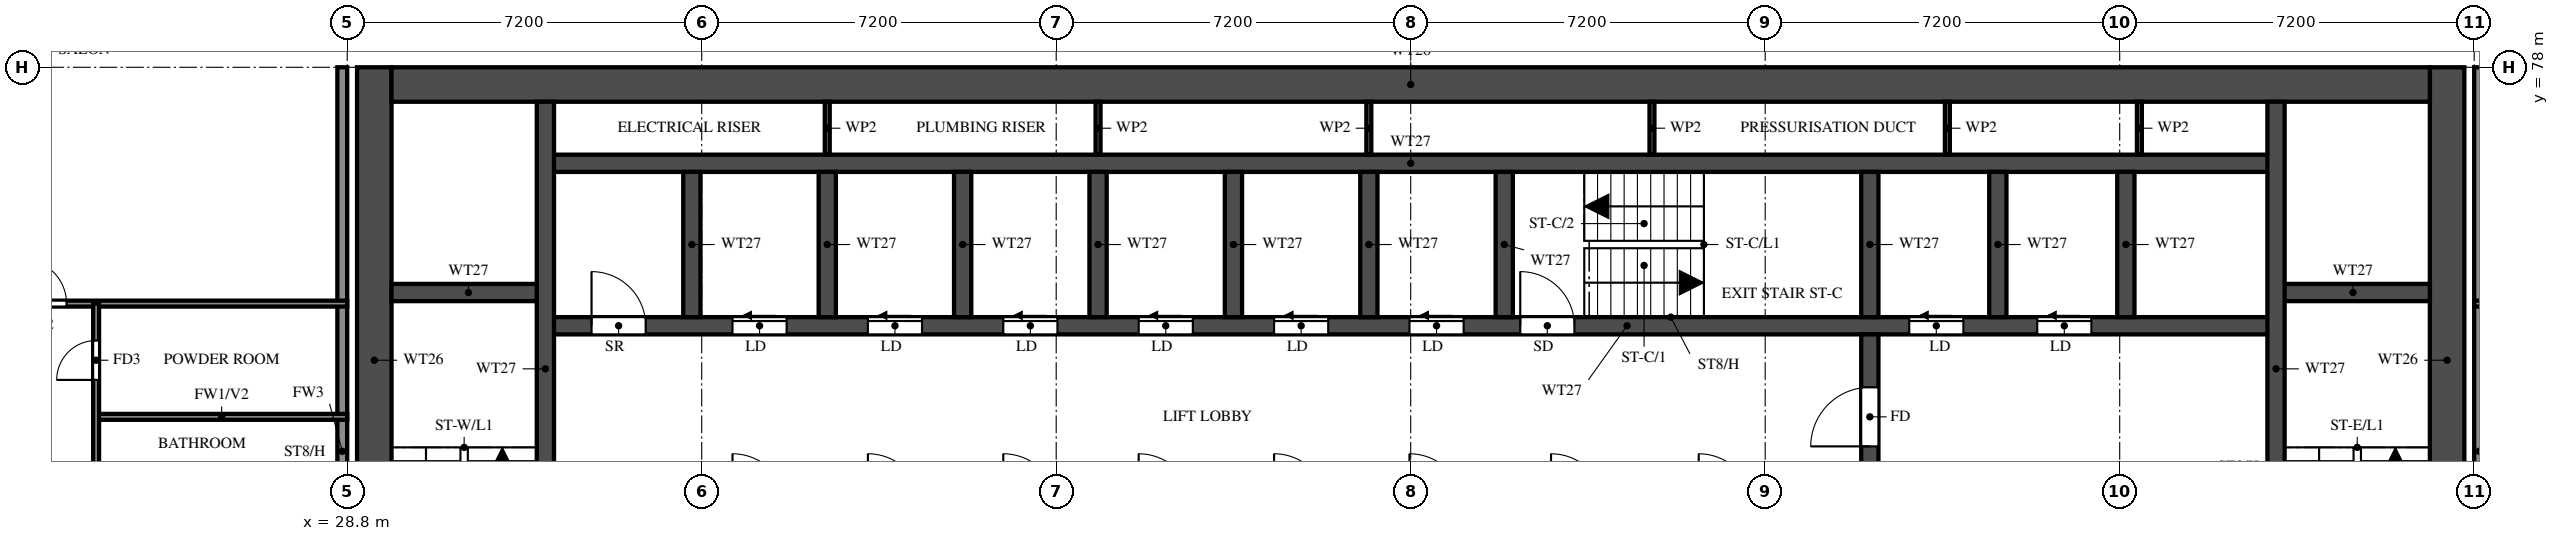
"""IFC4 building model, lengths in metres.
Left out: names, types, materials, properties, quantities, classifications, styles, units other than length and angle.
Written with IfcOpenShell. Run it as: python <this file> out.ifc"""

import sys

from ifc_helpers import new_model, si_unit, direction, frame, frame_2d, origin, place, context, subcontext, project, spatial, rectangle, extrude, element, fill, save


model = new_model("IFC4")
c1 = context("Model", 3, precision=1e-05, world=origin(), true_north=direction((0.0, 1.0)))
c2 = subcontext(c1, "Body", "Model", "MODEL_VIEW")
j1 = project(units=[si_unit("LENGTHUNIT", "METRE"), si_unit("PLANEANGLEUNIT", "RADIAN")], contexts=[c1])
p1 = place(None, origin())
s1 = spatial("IfcSite", under=j1, at=p1, CompositionType="ELEMENT")
p2 = place(p1, origin())
s2 = spatial("IfcBuilding", under=s1, at=p2, CompositionType="ELEMENT")
p3 = place(p2, frame((0.0, 0.0, 174.5)))
s3 = spatial("IfcBuildingStorey", under=s2, at=p3, CompositionType="ELEMENT", Elevation=174.5)
for number, where, z_axis, x_axis in (
    (1, (29.35, 66.1, 0.0), (0.0, 0.0, 1.0), (0.0, 1.0, 0.0)),
    (2, (71.45, 66.1, 0.0), (0.0, 0.0, 1.0), (0.0, 1.0, 0.0)),
):
    element("IfcWall", number, at=place(p3, frame(where, z_axis=z_axis, x_axis=x_axis)), inside=s3, PredefinedType="SHEAR", context=c2, shape_type="SweptSolid", body=[
        extrude(rectangle(XDim=11.9, YDim=0.7, at=frame_2d((5.95, 0.0))), origin(), (0.0, 0.0, 1.0), 3.2),
    ])
p4 = place(p3, frame((29.7, 77.65, 0.0), z_axis=(0.0, 0.0, 1.0), x_axis=(1.0, 0.0, 0.0)))
e3 = element("IfcWall", 3, at=p4, inside=s3, PredefinedType="SHEAR", context=c2, shape_type="SweptSolid", body=[
    extrude(rectangle(XDim=41.4, YDim=0.7, at=frame_2d((20.7, 0.0))), origin(), (0.0, 0.0, 1.0), 3.2),
])
p5 = place(p3, frame((32.825, 72.75, 0.0), z_axis=(0.0, 0.0, 1.0), x_axis=(1.0, 0.0, 0.0)))
e4 = element("IfcWall", 4, at=p5, inside=s3, PredefinedType="SHEAR", context=c2, shape_type="SweptSolid", body=[
    extrude(rectangle(XDim=35.15, YDim=0.35, at=frame_2d((17.575, 0.0))), origin(), (0.0, 0.0, 1.0), 3.2),
])
p6 = place(p5, frame((19.8, 0.0, 0.0)))
e5 = element("IfcOpeningElement", 5, at=p6, cuts=e4, PredefinedType="OPENING", context=c2, shape_type="SweptSolid", body=[
    extrude(rectangle(XDim=1.1, YDim=2.1, at=frame_2d((0.55, 1.05))), frame((0.0, 0.185, 0.0), z_axis=(0.0, -1.0, 0.0), x_axis=(1.0, 0.0, 0.0)), (0.0, 0.0, 1.0), 0.37),
])
p7 = place(p5, frame((27.7, 0.0, 0.0)))
e6 = element("IfcOpeningElement", 6, at=p7, cuts=e4, PredefinedType="OPENING", context=c2, shape_type="SweptSolid", body=[
    extrude(rectangle(XDim=1.1, YDim=2.1, at=frame_2d((0.55, 1.05))), frame((0.0, 0.185, 0.0), z_axis=(0.0, -1.0, 0.0), x_axis=(1.0, 0.0, 0.0)), (0.0, 0.0, 1.0), 0.37),
])
p8 = place(p5, frame((30.3, 0.0, 0.0)))
e7 = element("IfcOpeningElement", 7, at=p8, cuts=e4, PredefinedType="OPENING", context=c2, shape_type="SweptSolid", body=[
    extrude(rectangle(XDim=1.1, YDim=2.1, at=frame_2d((0.55, 1.05))), frame((0.0, 0.185, 0.0), z_axis=(0.0, -1.0, 0.0), x_axis=(1.0, 0.0, 0.0)), (0.0, 0.0, 1.0), 0.37),
])
p9 = place(p5, frame((3.8, 0.0, 0.0)))
e8 = element("IfcOpeningElement", 8, at=p9, cuts=e4, PredefinedType="OPENING", context=c2, shape_type="SweptSolid", body=[
    extrude(rectangle(XDim=1.1, YDim=2.1, at=frame_2d((0.55, 1.05))), frame((0.0, 0.185, 0.0), z_axis=(0.0, -1.0, 0.0), x_axis=(1.0, 0.0, 0.0)), (0.0, 0.0, 1.0), 0.37),
])
p10 = place(p5, frame((6.55, 0.0, 0.0)))
e9 = element("IfcOpeningElement", 9, at=p10, cuts=e4, PredefinedType="OPENING", context=c2, shape_type="SweptSolid", body=[
    extrude(rectangle(XDim=1.1, YDim=2.1, at=frame_2d((0.55, 1.05))), frame((0.0, 0.185, 0.0), z_axis=(0.0, -1.0, 0.0), x_axis=(1.0, 0.0, 0.0)), (0.0, 0.0, 1.0), 0.37),
])
p11 = place(p5, frame((9.3, 0.0, 0.0)))
e10 = element("IfcOpeningElement", 10, at=p11, cuts=e4, PredefinedType="OPENING", context=c2, shape_type="SweptSolid", body=[
    extrude(rectangle(XDim=1.1, YDim=2.1, at=frame_2d((0.55, 1.05))), frame((0.0, 0.185, 0.0), z_axis=(0.0, -1.0, 0.0), x_axis=(1.0, 0.0, 0.0)), (0.0, 0.0, 1.0), 0.37),
])
p12 = place(p5, frame((12.05, 0.0, 0.0)))
e11 = element("IfcOpeningElement", 11, at=p12, cuts=e4, PredefinedType="OPENING", context=c2, shape_type="SweptSolid", body=[
    extrude(rectangle(XDim=1.1, YDim=2.1, at=frame_2d((0.55, 1.05))), frame((0.0, 0.185, 0.0), z_axis=(0.0, -1.0, 0.0), x_axis=(1.0, 0.0, 0.0)), (0.0, 0.0, 1.0), 0.37),
])
p13 = place(p5, frame((14.8, 0.0, 0.0)))
e12 = element("IfcOpeningElement", 12, at=p13, cuts=e4, PredefinedType="OPENING", context=c2, shape_type="SweptSolid", body=[
    extrude(rectangle(XDim=1.1, YDim=2.1, at=frame_2d((0.55, 1.05))), frame((0.0, 0.185, 0.0), z_axis=(0.0, -1.0, 0.0), x_axis=(1.0, 0.0, 0.0)), (0.0, 0.0, 1.0), 0.37),
])
p14 = place(p5, frame((17.55, 0.0, 0.0)))
e13 = element("IfcOpeningElement", 13, at=p14, cuts=e4, PredefinedType="OPENING", context=c2, shape_type="SweptSolid", body=[
    extrude(rectangle(XDim=1.1, YDim=2.1, at=frame_2d((0.55, 1.05))), frame((0.0, 0.185, 0.0), z_axis=(0.0, -1.0, 0.0), x_axis=(1.0, 0.0, 0.0)), (0.0, 0.0, 1.0), 0.37),
])
p15 = place(p5, frame((0.938, 0.0, 0.0)))
e14 = element("IfcOpeningElement", 14, at=p15, cuts=e4, PredefinedType="OPENING", context=c2, shape_type="SweptSolid", body=[
    extrude(rectangle(XDim=1.1, YDim=2.1, at=frame_2d((0.55, 1.05))), frame((0.0, 0.185, 0.0), z_axis=(0.0, -1.0, 0.0), x_axis=(1.0, 0.0, 0.0)), (0.0, 0.0, 1.0), 0.37),
])
p16 = place(p3, frame((32.825, 76.05, 0.0), z_axis=(0.0, 0.0, 1.0), x_axis=(1.0, 0.0, 0.0)))
e15 = element("IfcWall", 15, at=p16, inside=s3, PredefinedType="SHEAR", context=c2, shape_type="SweptSolid", body=[
    extrude(rectangle(XDim=35.15, YDim=0.35, at=frame_2d((17.575, 0.0))), origin(), (0.0, 0.0, 1.0), 3.2),
])
for number, where, z_axis, x_axis in (
    (16, (29.7, 73.425, 0.0), (0.0, 0.0, 1.0), (1.0, 0.0, 0.0)),
    (17, (67.975, 73.425, 0.0), (0.0, 0.0, 1.0), (1.0, 0.0, 0.0)),
):
    element("IfcWall", number, at=place(p3, frame(where, z_axis=z_axis, x_axis=x_axis)), inside=s3, PredefinedType="SHEAR", context=c2, shape_type="SweptSolid", body=[
        extrude(rectangle(XDim=3.125, YDim=0.35, at=frame_2d((1.562, 0.0))), origin(), (0.0, 0.0, 1.0), 3.2),
    ])
p17 = place(p3, frame((32.825, 66.45, 0.0), z_axis=(0.0, 0.0, 1.0), x_axis=(0.0, 1.0, 0.0)))
e18 = element("IfcWall", 18, at=p17, inside=s3, PredefinedType="SHEAR", context=c2, shape_type="SweptSolid", body=[
    extrude(rectangle(XDim=10.85, YDim=0.35, at=frame_2d((5.425, 0.0))), origin(), (0.0, 0.0, 1.0), 3.2),
])
p18 = place(p3, frame((67.975, 66.45, 0.0), z_axis=(0.0, 0.0, 1.0), x_axis=(0.0, 1.0, 0.0)))
e19 = element("IfcWall", 19, at=p18, inside=s3, PredefinedType="SHEAR", context=c2, shape_type="SweptSolid", body=[
    extrude(rectangle(XDim=10.85, YDim=0.35, at=frame_2d((5.425, 0.0))), origin(), (0.0, 0.0, 1.0), 3.2),
])
p19 = place(p18, frame((0.15, 0.0, 0.0)))
e20 = element("IfcOpeningElement", 20, at=p19, cuts=e19, PredefinedType="OPENING", context=c2, shape_type="SweptSolid", body=[
    extrude(rectangle(XDim=1.1, YDim=2.1, at=frame_2d((0.55, 1.05))), frame((0.0, 0.185, 0.0), z_axis=(0.0, -1.0, 0.0), x_axis=(1.0, 0.0, 0.0)), (0.0, 0.0, 1.0), 0.37),
])
p20 = place(p3, frame((59.725, 66.45, 0.0), z_axis=(0.0, 0.0, 1.0), x_axis=(0.0, 1.0, 0.0)))
e21 = element("IfcWall", 21, at=p20, inside=s3, PredefinedType="SHEAR", context=c2, shape_type="SweptSolid", body=[
    extrude(rectangle(XDim=6.125, YDim=0.35, at=frame_2d((3.062, 0.0))), origin(), (0.0, 0.0, 1.0), 3.2),
])
p21 = place(p20, frame((3.85, 0.0, 0.0)))
e22 = element("IfcOpeningElement", 22, at=p21, cuts=e21, PredefinedType="OPENING", context=c2, shape_type="SweptSolid", body=[
    extrude(rectangle(XDim=1.2, YDim=2.1, at=frame_2d((0.6, 1.05))), frame((0.0, 0.185, 0.0), z_axis=(0.0, -1.0, 0.0), x_axis=(1.0, 0.0, 0.0)), (0.0, 0.0, 1.0), 0.37),
])
for number, where, z_axis, x_axis in (
    (23, (59.725, 72.925, 0.0), (0.0, 0.0, 1.0), (0.0, 1.0, 0.0)),
    (24, (35.8, 72.925, 0.0), (0.0, 0.0, 1.0), (0.0, 1.0, 0.0)),
    (25, (38.55, 72.925, 0.0), (0.0, 0.0, 1.0), (0.0, 1.0, 0.0)),
    (26, (41.3, 72.925, 0.0), (0.0, 0.0, 1.0), (0.0, 1.0, 0.0)),
    (27, (44.05, 72.925, 0.0), (0.0, 0.0, 1.0), (0.0, 1.0, 0.0)),
    (28, (46.8, 72.925, 0.0), (0.0, 0.0, 1.0), (0.0, 1.0, 0.0)),
    (29, (49.55, 72.925, 0.0), (0.0, 0.0, 1.0), (0.0, 1.0, 0.0)),
    (30, (52.3, 72.925, 0.0), (0.0, 0.0, 1.0), (0.0, 1.0, 0.0)),
    (31, (62.325, 72.925, 0.0), (0.0, 0.0, 1.0), (0.0, 1.0, 0.0)),
    (32, (64.925, 72.925, 0.0), (0.0, 0.0, 1.0), (0.0, 1.0, 0.0)),
):
    element("IfcWall", number, at=place(p3, frame(where, z_axis=z_axis, x_axis=x_axis)), inside=s3, PredefinedType="SHEAR", context=c2, shape_type="SweptSolid", body=[
        extrude(rectangle(XDim=2.95, YDim=0.35, at=frame_2d((1.475, 0.0))), origin(), (0.0, 0.0, 1.0), 3.2),
    ])
for number, where, z_axis, x_axis in (
    (33, (38.55, 76.225, 0.0), (0.0, 0.0, 1.0), (0.0, 1.0, 0.0)),
    (34, (44.05, 76.225, 0.0), (0.0, 0.0, 1.0), (0.0, 1.0, 0.0)),
    (35, (49.55, 76.225, 0.0), (0.0, 0.0, 1.0), (0.0, 1.0, 0.0)),
    (36, (55.3, 76.225, 0.0), (0.0, 0.0, 1.0), (0.0, 1.0, 0.0)),
    (37, (61.3, 76.225, 0.0), (0.0, 0.0, 1.0), (0.0, 1.0, 0.0)),
    (38, (65.2, 76.225, 0.0), (0.0, 0.0, 1.0), (0.0, 1.0, 0.0)),
):
    element("IfcWall", number, at=place(p3, frame(where, z_axis=z_axis, x_axis=x_axis)), inside=s3, PredefinedType="PARTITIONING", context=c2, shape_type="SweptSolid", body=[
        extrude(rectangle(XDim=1.075, YDim=0.1, at=frame_2d((0.538, 0.0))), origin(), (0.0, 0.0, 1.0), 3.2),
    ])
for number, where, z_axis, x_axis in (
    (39, (28.7, 62.4, 0.0), (0.0, 0.0, 1.0), (0.0, 1.0, 0.0)),
    (40, (72.1, 62.4, 0.0), (0.0, 0.0, 1.0), (0.0, 1.0, 0.0)),
):
    element("IfcWall", number, at=place(p3, frame(where, z_axis=z_axis, x_axis=x_axis)), inside=s3, PredefinedType="SOLIDWALL", context=c2, shape_type="SweptSolid", body=[
        extrude(rectangle(XDim=15.6, YDim=0.2, at=frame_2d((7.8, 0.0))), origin(), (0.0, 0.0, 1.0), 3.2),
    ])
p22 = place(p3, frame((23.7, 70.9, 0.0), z_axis=(0.0, 0.0, 1.0), x_axis=(1.0, 0.0, 0.0)))
e41 = element("IfcWall", 41, at=p22, inside=s3, PredefinedType="PARTITIONING", context=c2, shape_type="SweptSolid", body=[
    extrude(rectangle(XDim=5.1, YDim=0.12, at=frame_2d((2.55, 0.0))), origin(), (0.0, 0.0, 1.0), 3.2),
])
p23 = place(p3, frame((14.525, 73.2, 0.0), z_axis=(0.0, 0.0, 1.0), x_axis=(1.0, 0.0, 0.0)))
e42 = element("IfcWall", 42, at=p23, inside=s3, PredefinedType="PARTITIONING", context=c2, shape_type="SweptSolid", body=[
    extrude(rectangle(XDim=14.275, YDim=0.12, at=frame_2d((7.138, 0.0))), origin(), (0.0, 0.0, 1.0), 2.3),
])
p24 = place(p23, frame((7.675, 0.0, 0.0)))
e43 = element("IfcOpeningElement", 43, at=p24, cuts=e42, PredefinedType="OPENING", context=c2, shape_type="SweptSolid", body=[
    extrude(rectangle(XDim=0.9, YDim=2.1, at=frame_2d((0.45, 1.05))), frame((0.0, 0.07, 0.0), z_axis=(0.0, -1.0, 0.0), x_axis=(1.0, 0.0, 0.0)), (0.0, 0.0, 1.0), 0.14),
])
p25 = place(p3, frame((72.0, 73.2, 0.0), z_axis=(0.0, 0.0, 1.0), x_axis=(1.0, 0.0, 0.0)))
e44 = element("IfcWall", 44, at=p25, inside=s3, PredefinedType="PARTITIONING", context=c2, shape_type="SweptSolid", body=[
    extrude(rectangle(XDim=14.275, YDim=0.12, at=frame_2d((7.137, 0.0))), origin(), (0.0, 0.0, 1.0), 2.3),
])
p26 = place(p25, frame((5.7, 0.0, 0.0)))
e45 = element("IfcOpeningElement", 45, at=p26, cuts=e44, PredefinedType="OPENING", context=c2, shape_type="SweptSolid", body=[
    extrude(rectangle(XDim=0.9, YDim=2.1, at=frame_2d((0.45, 1.05))), frame((0.0, 0.07, 0.0), z_axis=(0.0, -1.0, 0.0), x_axis=(1.0, 0.0, 0.0)), (0.0, 0.0, 1.0), 0.14),
])
p27 = place(p3, frame((23.7, 61.2, 0.0), z_axis=(0.0, 0.0, 1.0), x_axis=(0.0, 1.0, 0.0)))
e46 = element("IfcWall", 46, at=p27, inside=s3, PredefinedType="PARTITIONING", context=c2, shape_type="SweptSolid", body=[
    extrude(rectangle(XDim=12.0, YDim=0.12, at=frame_2d((6.0, 0.0))), origin(), (0.0, 0.0, 1.0), 3.2),
])
p28 = place(p27, frame((4.2, 0.0, 0.0)))
e47 = element("IfcOpeningElement", 47, at=p28, cuts=e46, PredefinedType="OPENING", context=c2, shape_type="SweptSolid", body=[
    extrude(rectangle(XDim=0.9, YDim=2.1, at=frame_2d((0.45, 1.05))), frame((0.0, 0.07, 0.0), z_axis=(0.0, -1.0, 0.0), x_axis=(1.0, 0.0, 0.0)), (0.0, 0.0, 1.0), 0.14),
])
p29 = place(p27, frame((7.975, 0.0, 0.0)))
e48 = element("IfcOpeningElement", 48, at=p29, cuts=e46, PredefinedType="OPENING", context=c2, shape_type="SweptSolid", body=[
    extrude(rectangle(XDim=0.8, YDim=2.1, at=frame_2d((0.4, 1.05))), frame((0.0, 0.07, 0.0), z_axis=(0.0, -1.0, 0.0), x_axis=(1.0, 0.0, 0.0)), (0.0, 0.0, 1.0), 0.14),
])
p30 = place(p27, frame((10.45, 0.0, 0.0)))
e49 = element("IfcOpeningElement", 49, at=p30, cuts=e46, PredefinedType="OPENING", context=c2, shape_type="SweptSolid", body=[
    extrude(rectangle(XDim=0.8, YDim=2.1, at=frame_2d((0.4, 1.05))), frame((0.0, 0.07, 0.0), z_axis=(0.0, -1.0, 0.0), x_axis=(1.0, 0.0, 0.0)), (0.0, 0.0, 1.0), 0.14),
])
p31 = place(p6, origin())
e50 = element("IfcDoor", 50, at=p31, inside=s3, OperationType="SINGLE_SWING_LEFT", PredefinedType="DOOR", context=c2, shape_type="SweptSolid", body=[
    extrude(rectangle(XDim=1.1, YDim=2.1, at=frame_2d((0.55, 1.05))), frame((0.0, 0.025, 0.0), z_axis=(0.0, -1.0, 0.0), x_axis=(1.0, 0.0, 0.0)), (0.0, 0.0, 1.0), 0.05),
])
fill(e5, e50)
p32 = place(p21, origin())
e51 = element("IfcDoor", 51, at=p32, inside=s3, OperationType="SINGLE_SWING_LEFT", PredefinedType="DOOR", context=c2, shape_type="SweptSolid", body=[
    extrude(rectangle(XDim=1.2, YDim=2.1, at=frame_2d((0.6, 1.05))), frame((0.0, 0.025, 0.0), z_axis=(0.0, -1.0, 0.0), x_axis=(1.0, 0.0, 0.0)), (0.0, 0.0, 1.0), 0.05),
])
fill(e22, e51)
p33 = place(p7, origin())
e52 = element("IfcDoor", 52, at=p33, inside=s3, OperationType="SLIDING_TO_LEFT", PredefinedType="DOOR", context=c2, shape_type="SweptSolid", body=[
    extrude(rectangle(XDim=1.1, YDim=2.1, at=frame_2d((0.55, 1.05))), frame((0.0, 0.025, 0.0), z_axis=(0.0, -1.0, 0.0), x_axis=(1.0, 0.0, 0.0)), (0.0, 0.0, 1.0), 0.05),
])
fill(e6, e52)
p34 = place(p8, origin())
e53 = element("IfcDoor", 53, at=p34, inside=s3, OperationType="SLIDING_TO_LEFT", PredefinedType="DOOR", context=c2, shape_type="SweptSolid", body=[
    extrude(rectangle(XDim=1.1, YDim=2.1, at=frame_2d((0.55, 1.05))), frame((0.0, 0.025, 0.0), z_axis=(0.0, -1.0, 0.0), x_axis=(1.0, 0.0, 0.0)), (0.0, 0.0, 1.0), 0.05),
])
fill(e7, e53)
p35 = place(p9, origin())
e54 = element("IfcDoor", 54, at=p35, inside=s3, OperationType="SLIDING_TO_LEFT", PredefinedType="DOOR", context=c2, shape_type="SweptSolid", body=[
    extrude(rectangle(XDim=1.1, YDim=2.1, at=frame_2d((0.55, 1.05))), frame((0.0, 0.025, 0.0), z_axis=(0.0, -1.0, 0.0), x_axis=(1.0, 0.0, 0.0)), (0.0, 0.0, 1.0), 0.05),
])
fill(e8, e54)
p36 = place(p10, origin())
e55 = element("IfcDoor", 55, at=p36, inside=s3, OperationType="SLIDING_TO_LEFT", PredefinedType="DOOR", context=c2, shape_type="SweptSolid", body=[
    extrude(rectangle(XDim=1.1, YDim=2.1, at=frame_2d((0.55, 1.05))), frame((0.0, 0.025, 0.0), z_axis=(0.0, -1.0, 0.0), x_axis=(1.0, 0.0, 0.0)), (0.0, 0.0, 1.0), 0.05),
])
fill(e9, e55)
p37 = place(p11, origin())
e56 = element("IfcDoor", 56, at=p37, inside=s3, OperationType="SLIDING_TO_LEFT", PredefinedType="DOOR", context=c2, shape_type="SweptSolid", body=[
    extrude(rectangle(XDim=1.1, YDim=2.1, at=frame_2d((0.55, 1.05))), frame((0.0, 0.025, 0.0), z_axis=(0.0, -1.0, 0.0), x_axis=(1.0, 0.0, 0.0)), (0.0, 0.0, 1.0), 0.05),
])
fill(e10, e56)
p38 = place(p12, origin())
e57 = element("IfcDoor", 57, at=p38, inside=s3, OperationType="SLIDING_TO_LEFT", PredefinedType="DOOR", context=c2, shape_type="SweptSolid", body=[
    extrude(rectangle(XDim=1.1, YDim=2.1, at=frame_2d((0.55, 1.05))), frame((0.0, 0.025, 0.0), z_axis=(0.0, -1.0, 0.0), x_axis=(1.0, 0.0, 0.0)), (0.0, 0.0, 1.0), 0.05),
])
fill(e11, e57)
p39 = place(p13, origin())
e58 = element("IfcDoor", 58, at=p39, inside=s3, OperationType="SLIDING_TO_LEFT", PredefinedType="DOOR", context=c2, shape_type="SweptSolid", body=[
    extrude(rectangle(XDim=1.1, YDim=2.1, at=frame_2d((0.55, 1.05))), frame((0.0, 0.025, 0.0), z_axis=(0.0, -1.0, 0.0), x_axis=(1.0, 0.0, 0.0)), (0.0, 0.0, 1.0), 0.05),
])
fill(e12, e58)
p40 = place(p14, origin())
e59 = element("IfcDoor", 59, at=p40, inside=s3, OperationType="SLIDING_TO_LEFT", PredefinedType="DOOR", context=c2, shape_type="SweptSolid", body=[
    extrude(rectangle(XDim=1.1, YDim=2.1, at=frame_2d((0.55, 1.05))), frame((0.0, 0.025, 0.0), z_axis=(0.0, -1.0, 0.0), x_axis=(1.0, 0.0, 0.0)), (0.0, 0.0, 1.0), 0.05),
])
fill(e13, e59)
p41 = place(p15, origin())
e60 = element("IfcDoor", 60, at=p41, inside=s3, OperationType="SINGLE_SWING_LEFT", PredefinedType="DOOR", context=c2, shape_type="SweptSolid", body=[
    extrude(rectangle(XDim=1.1, YDim=2.1, at=frame_2d((0.55, 1.05))), frame((0.0, 0.025, 0.0), z_axis=(0.0, -1.0, 0.0), x_axis=(1.0, 0.0, 0.0)), (0.0, 0.0, 1.0), 0.05),
])
fill(e14, e60)
p42 = place(p24, origin())
e61 = element("IfcDoor", 61, at=p42, inside=s3, OperationType="SINGLE_SWING_LEFT", PredefinedType="DOOR", context=c2, shape_type="SweptSolid", body=[
    extrude(rectangle(XDim=0.9, YDim=2.1, at=frame_2d((0.45, 1.05))), frame((0.0, 0.025, 0.0), z_axis=(0.0, -1.0, 0.0), x_axis=(1.0, 0.0, 0.0)), (0.0, 0.0, 1.0), 0.05),
])
fill(e43, e61)
p43 = place(p30, origin())
e62 = element("IfcDoor", 62, at=p43, inside=s3, OperationType="SINGLE_SWING_LEFT", PredefinedType="DOOR", context=c2, shape_type="SweptSolid", body=[
    extrude(rectangle(XDim=0.8, YDim=2.1, at=frame_2d((0.4, 1.05))), frame((0.0, 0.025, 0.0), z_axis=(0.0, -1.0, 0.0), x_axis=(1.0, 0.0, 0.0)), (0.0, 0.0, 1.0), 0.05),
])
fill(e49, e62)
save(model, sys.argv[1])
